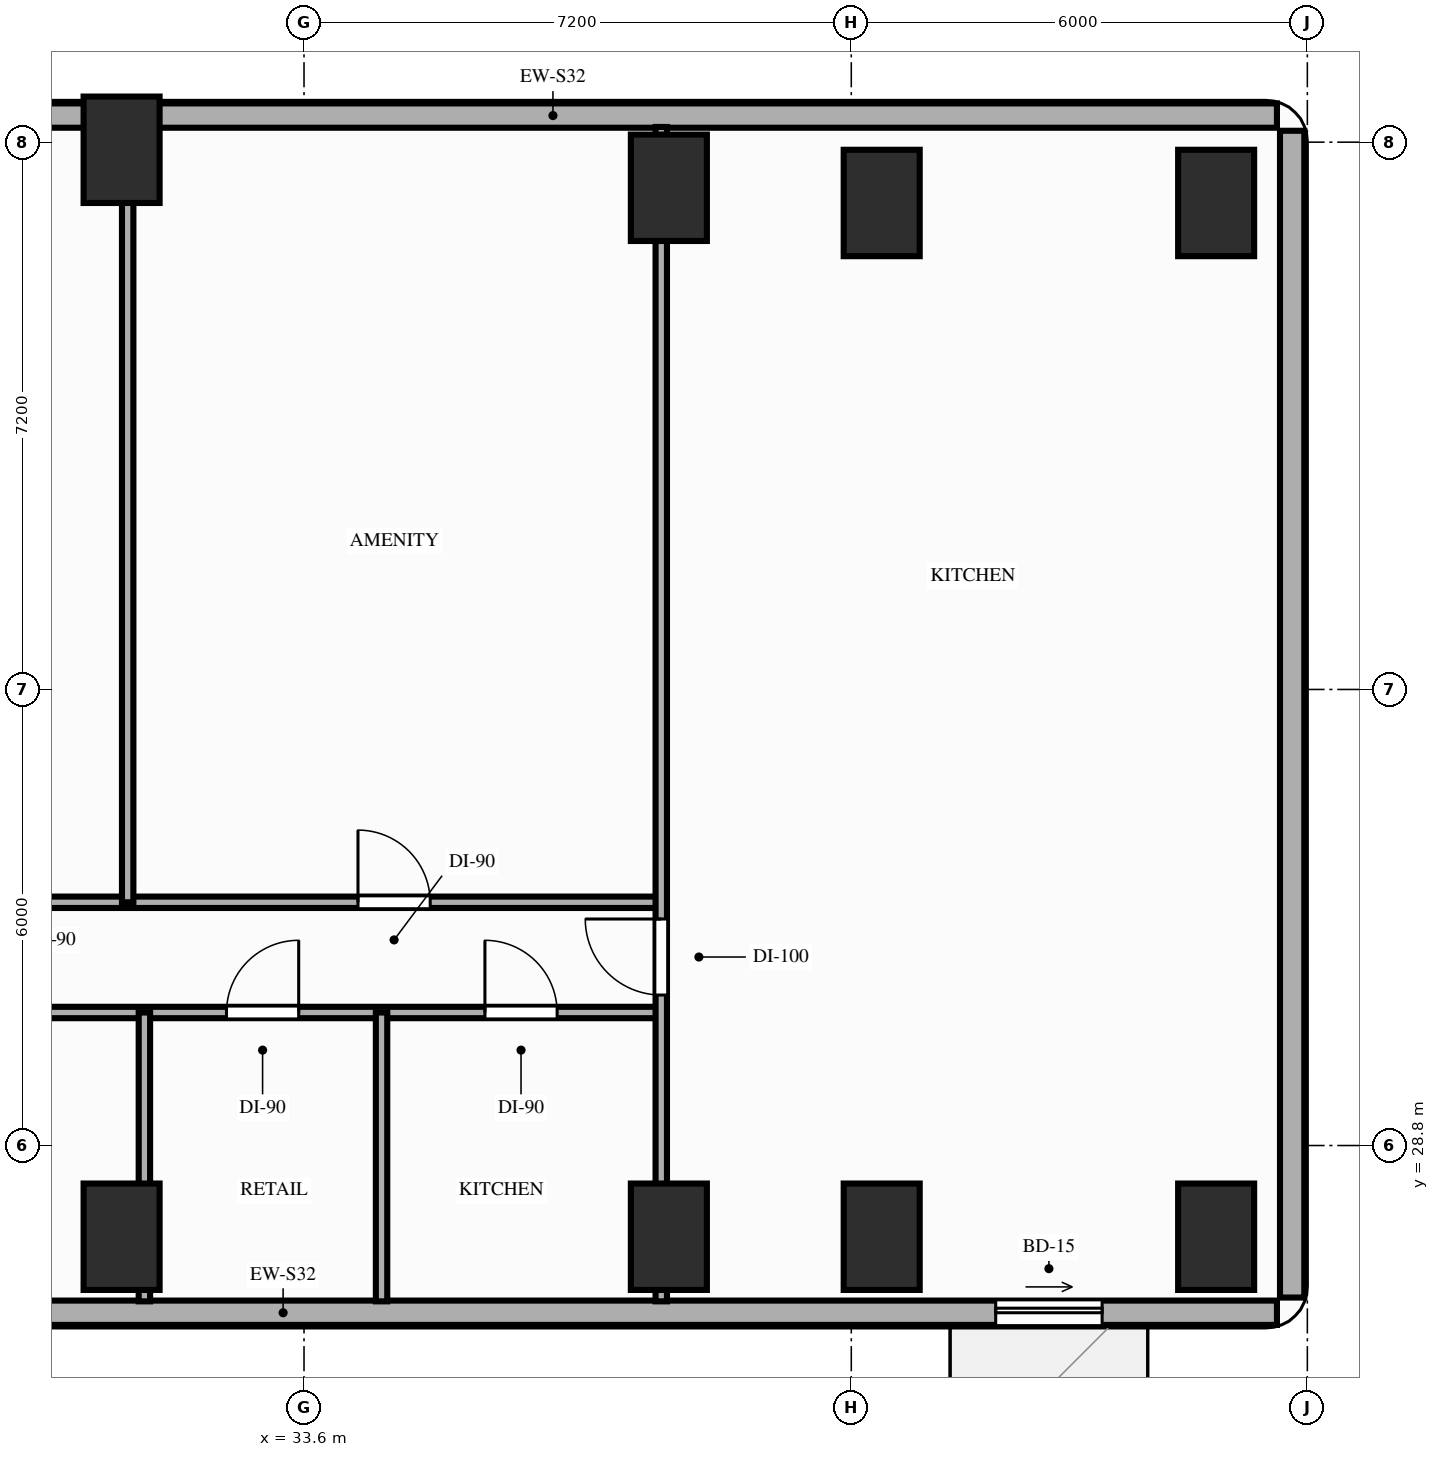
"""IFC4 building model, lengths in metres.
Left out: names, types, materials, properties, quantities, classifications, styles, units other than length and angle.
Written with IfcOpenShell. Run it as: python <this file> out.ifc"""

import sys

from ifc_helpers import new_model, si_unit, direction, frame, frame_2d, origin, origin_2d, place, context, subcontext, project, spatial, rectangle, extrude, element, fill, save


model = new_model("IFC4")
c1 = context("Model", 3, precision=1e-05, world=origin(), true_north=direction((0.0, 1.0)))
c2 = subcontext(c1, "Body", "Model", "MODEL_VIEW")
j1 = project(units=[si_unit("LENGTHUNIT", "METRE"), si_unit("PLANEANGLEUNIT", "RADIAN")], contexts=[c1])
p1 = place(None, origin())
s1 = spatial("IfcSite", under=j1, at=p1, CompositionType="ELEMENT")
p2 = place(p1, origin())
s2 = spatial("IfcBuilding", under=s1, at=p2, CompositionType="ELEMENT")
p3 = place(p2, frame((0.0, 0.0, 39.8)))
s3 = spatial("IfcBuildingStorey", under=s2, at=p3, CompositionType="ELEMENT", Elevation=39.8)
for number, where, z_axis, x_axis in (
    (1, (31.2, 27.6, -0.4), (0.0, 0.0, 1.0), (1.0, 0.0, 0.0)),
    (2, (31.2, 41.9, -0.4), (0.0, 0.0, 1.0), (1.0, 0.0, 0.0)),
    (3, (38.4, 27.6, -0.4), (0.0, 0.0, 1.0), (1.0, 0.0, 0.0)),
    (4, (38.4, 41.4, -0.4), (0.0, 0.0, 1.0), (1.0, 0.0, 0.0)),
):
    element("IfcColumn", number, at=place(p3, frame(where, z_axis=z_axis, x_axis=x_axis)), inside=s3, PredefinedType="COLUMN", context=c2, shape_type="SweptSolid", body=[
        extrude(rectangle(XDim=1.0, YDim=1.4, at=origin_2d()), origin(), (0.0, 0.0, 1.0), 4.2),
    ])
for number, where, z_axis, x_axis in (
    (5, (41.2, 27.6, 0.0), (0.0, 0.0, 1.0), (1.0, 0.0, 0.0)),
    (6, (41.2, 41.2, 0.0), (0.0, 0.0, 1.0), (1.0, 0.0, 0.0)),
    (7, (45.6, 27.6, 0.0), (0.0, 0.0, 1.0), (1.0, 0.0, 0.0)),
    (8, (45.6, 41.2, 0.0), (0.0, 0.0, 1.0), (1.0, 0.0, 0.0)),
):
    element("IfcColumn", number, at=place(p3, frame(where, z_axis=z_axis, x_axis=x_axis)), inside=s3, PredefinedType="COLUMN", context=c2, shape_type="SweptSolid", body=[
        extrude(rectangle(XDim=1.0, YDim=1.4, at=origin_2d()), origin(), (0.0, 0.0, 1.0), 3.8),
    ])
p4 = place(p3, frame((46.4, 42.35, 0.0), z_axis=(0.0, 0.0, 1.0), x_axis=(-1.0, 0.0, 0.0)))
e9 = element("IfcWall", 9, at=p4, inside=s3, PredefinedType="STANDARD", context=c2, shape_type="SweptSolid", body=[
    extrude(rectangle(XDim=19.05, YDim=0.32, at=frame_2d((9.525, 0.0))), origin(), (0.0, 0.0, 1.0), 3.0),
])
p5 = place(p3, frame((20.25, 26.6, 0.0), z_axis=(0.0, 0.0, 1.0), x_axis=(1.0, 0.0, 0.0)))
e10 = element("IfcWall", 10, at=p5, inside=s3, PredefinedType="STANDARD", context=c2, shape_type="SweptSolid", body=[
    extrude(rectangle(XDim=26.15, YDim=0.32, at=frame_2d((13.075, 0.0))), origin(), (0.0, 0.0, 1.0), 3.62),
])
p6 = place(p5, frame((7.95, 0.0, 0.0)))
e11 = element("IfcOpeningElement", 11, at=p6, cuts=e10, PredefinedType="OPENING", context=c2, shape_type="SweptSolid", body=[
    extrude(rectangle(XDim=1.4, YDim=2.1, at=frame_2d((0.7, 1.05))), frame((0.0, 0.17, 0.0), z_axis=(0.0, -1.0, 0.0), x_axis=(1.0, 0.0, 0.0)), (0.0, 0.0, 1.0), 0.34),
])
p7 = place(p5, frame((22.45, 0.0, 0.0)))
e12 = element("IfcOpeningElement", 12, at=p7, cuts=e10, PredefinedType="OPENING", context=c2, shape_type="SweptSolid", body=[
    extrude(rectangle(XDim=1.4, YDim=2.1, at=frame_2d((0.7, 1.05))), frame((0.0, 0.17, 0.0), z_axis=(0.0, -1.0, 0.0), x_axis=(1.0, 0.0, 0.0)), (0.0, 0.0, 1.0), 0.34),
])
p8 = place(p5, frame((1.95, 0.0, 0.85)))
e13 = element("IfcOpeningElement", 13, at=p8, cuts=e10, PredefinedType="OPENING", context=c2, shape_type="SweptSolid", body=[
    extrude(rectangle(XDim=2.4, YDim=1.8, at=frame_2d((1.2, 0.9))), frame((0.0, 0.17, 0.0), z_axis=(0.0, -1.0, 0.0), x_axis=(1.0, 0.0, 0.0)), (0.0, 0.0, 1.0), 0.34),
])
p9 = place(p3, frame((46.6, 26.8, 0.0), z_axis=(0.0, 0.0, 1.0), x_axis=(0.0, 1.0, 0.0)))
e14 = element("IfcWall", 14, at=p9, inside=s3, PredefinedType="STANDARD", context=c2, shape_type="SweptSolid", body=[
    extrude(rectangle(XDim=15.35, YDim=0.32, at=frame_2d((7.675, 0.0))), origin(), (0.0, 0.0, 1.0), 3.62),
])
p10 = place(p3, frame((27.15, 30.55, 0.0), z_axis=(0.0, 0.0, 1.0), x_axis=(1.0, 0.0, 0.0)))
e15 = element("IfcWall", 15, at=p10, inside=s3, PredefinedType="PARTITIONING", context=c2, shape_type="SweptSolid", body=[
    extrude(rectangle(XDim=11.15, YDim=0.15, at=frame_2d((5.575, 0.0))), origin(), (0.0, 0.0, 1.0), 3.0),
])
p11 = place(p10, frame((1.7, 0.0, 0.0)))
e16 = element("IfcOpeningElement", 16, at=p11, cuts=e15, PredefinedType="OPENING", context=c2, shape_type="SweptSolid", body=[
    extrude(rectangle(XDim=0.95, YDim=2.15, at=frame_2d((0.475, 1.075))), frame((0.0, 0.085, 0.0), z_axis=(0.0, -1.0, 0.0), x_axis=(1.0, 0.0, 0.0)), (0.0, 0.0, 1.0), 0.17),
])
p12 = place(p10, frame((5.43, 0.0, 0.0)))
e17 = element("IfcOpeningElement", 17, at=p12, cuts=e15, PredefinedType="OPENING", context=c2, shape_type="SweptSolid", body=[
    extrude(rectangle(XDim=0.95, YDim=2.15, at=frame_2d((0.475, 1.075))), frame((0.0, 0.085, 0.0), z_axis=(0.0, -1.0, 0.0), x_axis=(1.0, 0.0, 0.0)), (0.0, 0.0, 1.0), 0.17),
])
p13 = place(p10, frame((8.83, 0.0, 0.0)))
e18 = element("IfcOpeningElement", 18, at=p13, cuts=e15, PredefinedType="OPENING", context=c2, shape_type="SweptSolid", body=[
    extrude(rectangle(XDim=0.95, YDim=2.15, at=frame_2d((0.475, 1.075))), frame((0.0, 0.085, 0.0), z_axis=(0.0, -1.0, 0.0), x_axis=(1.0, 0.0, 0.0)), (0.0, 0.0, 1.0), 0.17),
])
p14 = place(p3, frame((27.15, 32.0, 0.0), z_axis=(0.0, 0.0, 1.0), x_axis=(1.0, 0.0, 0.0)))
e19 = element("IfcWall", 19, at=p14, inside=s3, PredefinedType="PARTITIONING", context=c2, shape_type="SweptSolid", body=[
    extrude(rectangle(XDim=11.15, YDim=0.15, at=frame_2d((5.575, 0.0))), origin(), (0.0, 0.0, 1.0), 3.0),
])
p15 = place(p14, frame((1.59, 0.0, 0.0)))
e20 = element("IfcOpeningElement", 20, at=p15, cuts=e19, PredefinedType="OPENING", context=c2, shape_type="SweptSolid", body=[
    extrude(rectangle(XDim=0.95, YDim=2.15, at=frame_2d((0.475, 1.075))), frame((0.0, 0.085, 0.0), z_axis=(0.0, -1.0, 0.0), x_axis=(1.0, 0.0, 0.0)), (0.0, 0.0, 1.0), 0.17),
])
p16 = place(p14, frame((7.16, 0.0, 0.0)))
e21 = element("IfcOpeningElement", 21, at=p16, cuts=e19, PredefinedType="OPENING", context=c2, shape_type="SweptSolid", body=[
    extrude(rectangle(XDim=0.95, YDim=2.15, at=frame_2d((0.475, 1.075))), frame((0.0, 0.085, 0.0), z_axis=(0.0, -1.0, 0.0), x_axis=(1.0, 0.0, 0.0)), (0.0, 0.0, 1.0), 0.17),
])
p17 = place(p3, frame((38.3, 26.75, 0.0), z_axis=(0.0, 0.0, 1.0), x_axis=(0.0, 1.0, 0.0)))
e22 = element("IfcWall", 22, at=p17, inside=s3, PredefinedType="PARTITIONING", context=c2, shape_type="SweptSolid", body=[
    extrude(rectangle(XDim=15.45, YDim=0.15, at=frame_2d((7.725, 0.0))), origin(), (0.0, 0.0, 1.0), 3.0),
])
p18 = place(p17, frame((4.03, 0.0, 0.0)))
e23 = element("IfcOpeningElement", 23, at=p18, cuts=e22, PredefinedType="OPENING", context=c2, shape_type="SweptSolid", body=[
    extrude(rectangle(XDim=1.0, YDim=2.15, at=frame_2d((0.5, 1.075))), frame((0.0, 0.085, 0.0), z_axis=(0.0, -1.0, 0.0), x_axis=(1.0, 0.0, 0.0)), (0.0, 0.0, 1.0), 0.17),
])
for number, where, z_axis, x_axis in (
    (24, (31.5, 26.75, 0.0), (0.0, 0.0, 1.0), (0.0, 1.0, 0.0)),
    (25, (34.62, 26.75, 0.0), (0.0, 0.0, 1.0), (0.0, 1.0, 0.0)),
):
    element("IfcWall", number, at=place(p3, frame(where, z_axis=z_axis, x_axis=x_axis)), inside=s3, PredefinedType="PARTITIONING", context=c2, shape_type="SweptSolid", body=[
        extrude(rectangle(XDim=3.8, YDim=0.15, at=frame_2d((1.9, 0.0))), origin(), (0.0, 0.0, 1.0), 3.0),
    ])
p19 = place(p3, frame((31.28, 32.0, 0.0), z_axis=(0.0, 0.0, 1.0), x_axis=(0.0, 1.0, 0.0)))
e26 = element("IfcWall", 26, at=p19, inside=s3, PredefinedType="PARTITIONING", context=c2, shape_type="SweptSolid", body=[
    extrude(rectangle(XDim=10.2, YDim=0.15, at=frame_2d((5.1, 0.0))), origin(), (0.0, 0.0, 1.0), 3.0),
])
p20 = place(p7, origin())
e27 = element("IfcDoor", 27, at=p20, inside=s3, OperationType="SLIDING_TO_RIGHT", PredefinedType="DOOR", context=c2, shape_type="SweptSolid", body=[
    extrude(rectangle(XDim=1.4, YDim=2.1, at=frame_2d((0.7, 1.05))), frame((0.0, 0.025, 0.0), z_axis=(0.0, -1.0, 0.0), x_axis=(1.0, 0.0, 0.0)), (0.0, 0.0, 1.0), 0.05),
])
fill(e12, e27)
p21 = place(p18, origin())
e28 = element("IfcDoor", 28, at=p21, inside=s3, OperationType="SINGLE_SWING_RIGHT", PredefinedType="DOOR", context=c2, shape_type="SweptSolid", body=[
    extrude(rectangle(XDim=1.0, YDim=2.15, at=frame_2d((0.5, 1.075))), frame((0.0, 0.025, 0.0), z_axis=(0.0, -1.0, 0.0), x_axis=(1.0, 0.0, 0.0)), (0.0, 0.0, 1.0), 0.05),
])
fill(e23, e28)
p22 = place(p12, origin())
e29 = element("IfcDoor", 29, at=p22, inside=s3, OperationType="SINGLE_SWING_RIGHT", PredefinedType="DOOR", context=c2, shape_type="SweptSolid", body=[
    extrude(rectangle(XDim=0.95, YDim=2.15, at=frame_2d((0.475, 1.075))), frame((0.0, 0.025, 0.0), z_axis=(0.0, -1.0, 0.0), x_axis=(1.0, 0.0, 0.0)), (0.0, 0.0, 1.0), 0.05),
])
fill(e17, e29)
p23 = place(p13, origin())
e30 = element("IfcDoor", 30, at=p23, inside=s3, OperationType="SINGLE_SWING_LEFT", PredefinedType="DOOR", context=c2, shape_type="SweptSolid", body=[
    extrude(rectangle(XDim=0.95, YDim=2.15, at=frame_2d((0.475, 1.075))), frame((0.0, 0.025, 0.0), z_axis=(0.0, -1.0, 0.0), x_axis=(1.0, 0.0, 0.0)), (0.0, 0.0, 1.0), 0.05),
])
fill(e18, e30)
p24 = place(p16, origin())
e31 = element("IfcDoor", 31, at=p24, inside=s3, OperationType="SINGLE_SWING_LEFT", PredefinedType="DOOR", context=c2, shape_type="SweptSolid", body=[
    extrude(rectangle(XDim=0.95, YDim=2.15, at=frame_2d((0.475, 1.075))), frame((0.0, 0.025, 0.0), z_axis=(0.0, -1.0, 0.0), x_axis=(1.0, 0.0, 0.0)), (0.0, 0.0, 1.0), 0.05),
])
fill(e21, e31)
save(model, sys.argv[1])
